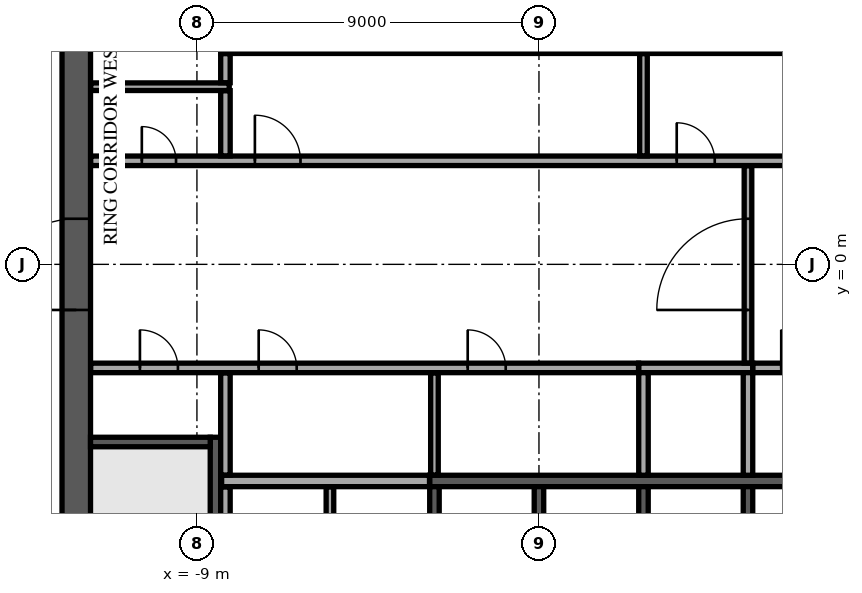
"""IFC4 building model, lengths in metres.
Left out: names, types, materials, properties, quantities, classifications, styles, units other than length and angle.
Written with IfcOpenShell. Run it as: python <this file> out.ifc"""

import sys

from ifc_helpers import new_model, si_unit, direction, frame, frame_2d, origin, place, context, subcontext, project, spatial, rectangle, extrude, element, fill, save


model = new_model("IFC4")
c1 = context("Model", 3, precision=1e-05, world=origin(), true_north=direction((0.0, 1.0)))
c2 = subcontext(c1, "Body", "Model", "MODEL_VIEW")
j1 = project(units=[si_unit("LENGTHUNIT", "METRE"), si_unit("PLANEANGLEUNIT", "RADIAN")], contexts=[c1])
p1 = place(None, origin())
s1 = spatial("IfcSite", under=j1, at=p1, CompositionType="ELEMENT")
p2 = place(p1, origin())
s2 = spatial("IfcBuilding", under=s1, at=p2, CompositionType="ELEMENT")
p3 = place(p2, frame((0.0, 0.0, 274.9)))
s3 = spatial("IfcBuildingStorey", under=s2, at=p3, CompositionType="ELEMENT", Elevation=274.9)
p4 = place(p3, frame((-12.175, -11.8, 0.0), z_axis=(0.0, 0.0, 1.0), x_axis=(0.0, 1.0, 0.0)))
e1 = element("IfcWall", 1, at=p4, inside=s3, PredefinedType="SHEAR", context=c2, shape_type="SweptSolid", body=[
    extrude(rectangle(XDim=23.6, YDim=0.75, at=frame_2d((11.8, 0.0))), origin(), (0.0, 0.0, 1.0), 3.64),
])
p5 = place(p4, frame((10.6, 0.0, 0.0)))
e2 = element("IfcOpeningElement", 2, at=p5, cuts=e1, PredefinedType="OPENING", context=c2, shape_type="SweptSolid", body=[
    extrude(rectangle(XDim=2.4, YDim=2.4, at=frame_2d((1.2, 1.2))), frame((0.0, 0.385, 0.0), z_axis=(0.0, -1.0, 0.0), x_axis=(1.0, 0.0, 0.0)), (0.0, 0.0, 1.0), 0.77),
])
p6 = place(p3, frame((-8.375, 5.7, 0.0), z_axis=(0.0, 0.0, 1.0), x_axis=(1.0, 0.0, 0.0)))
e3 = element("IfcWall", 3, at=p6, inside=s3, PredefinedType="SOLIDWALL", context=c2, shape_type="SweptSolid", body=[
    extrude(rectangle(XDim=16.75, YDim=0.3, at=frame_2d((8.375, 0.0))), origin(), (0.0, 0.0, 1.0), 3.64),
])
p7 = place(p3, frame((-2.875, -5.7, 0.0), z_axis=(0.0, 0.0, 1.0), x_axis=(1.0, 0.0, 0.0)))
e4 = element("IfcWall", 4, at=p7, inside=s3, PredefinedType="SOLIDWALL", context=c2, shape_type="SweptSolid", body=[
    extrude(rectangle(XDim=11.25, YDim=0.3, at=frame_2d((5.625, 0.0))), origin(), (0.0, 0.0, 1.0), 3.64),
])
p8 = place(p3, frame((2.625, -2.725, 0.0), z_axis=(0.0, 0.0, 1.0), x_axis=(1.0, 0.0, 0.0)))
e5 = element("IfcWall", 5, at=p8, inside=s3, PredefinedType="SOLIDWALL", context=c2, shape_type="SweptSolid", body=[
    extrude(rectangle(XDim=3.0, YDim=0.25, at=frame_2d((1.5, 0.0))), origin(), (0.0, 0.0, 1.0), 3.64),
])
for number, where, z_axis, x_axis in (
    (6, (2.75, -5.55, 0.0), (0.0, 0.0, 1.0), (0.0, 1.0, 0.0)),
    (7, (5.5, -5.55, 0.0), (0.0, 0.0, 1.0), (0.0, 1.0, 0.0)),
    (8, (-2.75, -8.55, 0.0), (0.0, 0.0, 1.0), (0.0, 1.0, 0.0)),
    (9, (0.0, -8.55, 0.0), (0.0, 0.0, 1.0), (0.0, 1.0, 0.0)),
    (10, (2.75, -8.55, 0.0), (0.0, 0.0, 1.0), (0.0, 1.0, 0.0)),
    (11, (5.5, -8.55, 0.0), (0.0, 0.0, 1.0), (0.0, 1.0, 0.0)),
):
    element("IfcWall", number, at=place(p3, frame(where, z_axis=z_axis, x_axis=x_axis)), inside=s3, PredefinedType="SOLIDWALL", context=c2, shape_type="SweptSolid", body=[
        extrude(rectangle(XDim=2.7, YDim=0.25, at=frame_2d((1.35, 0.0))), origin(), (0.0, 0.0, 1.0), 3.64),
    ])
p9 = place(p3, frame((-8.512, -4.55, 0.0), z_axis=(0.0, 0.0, 1.0), x_axis=(0.0, -1.0, 0.0)))
e12 = element("IfcWall", 12, at=p9, inside=s3, PredefinedType="SOLIDWALL", context=c2, shape_type="SweptSolid", body=[
    extrude(rectangle(XDim=7.25, YDim=0.275, at=frame_2d((3.625, 0.0))), origin(), (0.0, 0.0, 1.0), 3.64),
])
p10 = place(p9, frame((6.0, 0.0, 0.0)))
e13 = element("IfcOpeningElement", 13, at=p10, cuts=e12, PredefinedType="OPENING", context=c2, shape_type="SweptSolid", body=[
    extrude(rectangle(XDim=1.0, YDim=2.1, at=frame_2d((0.5, 1.05))), frame((0.0, 0.147, 0.0), z_axis=(0.0, -1.0, 0.0), x_axis=(1.0, 0.0, 0.0)), (0.0, 0.0, 1.0), 0.295),
])
p11 = place(p3, frame((-8.65, -4.675, 0.0), z_axis=(0.0, 0.0, 1.0), x_axis=(-1.0, 0.0, 0.0)))
e14 = element("IfcWall", 14, at=p11, inside=s3, PredefinedType="SOLIDWALL", context=c2, shape_type="SweptSolid", body=[
    extrude(rectangle(XDim=3.15, YDim=0.25, at=frame_2d((1.575, 0.0))), origin(), (0.0, 0.0, 1.0), 3.64),
])
p12 = place(p3, frame((-8.25, -8.545, 0.0), z_axis=(0.0, 0.0, 1.0), x_axis=(0.0, 1.0, 0.0)))
e15 = element("IfcWall", 15, at=p12, inside=s3, PredefinedType="PARTITIONING", context=c2, shape_type="SweptSolid", body=[
    extrude(rectangle(XDim=2.69, YDim=0.25, at=frame_2d((1.345, 0.0))), origin(), (0.0, 0.0, 1.0), 3.64),
])
p13 = place(p3, frame((-5.5, -8.545, 0.0), z_axis=(0.0, 0.0, 1.0), x_axis=(0.0, 1.0, 0.0)))
e16 = element("IfcWall", 16, at=p13, inside=s3, PredefinedType="PARTITIONING", context=c2, shape_type="SweptSolid", body=[
    extrude(rectangle(XDim=2.69, YDim=0.2, at=frame_2d((1.345, 0.0))), origin(), (0.0, 0.0, 1.0), 3.64),
])
p14 = place(p3, frame((-8.35, -5.7, 0.0), z_axis=(0.0, 0.0, 1.0), x_axis=(1.0, 0.0, 0.0)))
e17 = element("IfcWall", 17, at=p14, inside=s3, PredefinedType="PARTITIONING", context=c2, shape_type="SweptSolid", body=[
    extrude(rectangle(XDim=5.47, YDim=0.3, at=frame_2d((2.735, 0.0))), origin(), (0.0, 0.0, 1.0), 3.64),
])
p15 = place(p3, frame((-8.25, -5.545, 0.0), z_axis=(0.0, 0.0, 1.0), x_axis=(0.0, 1.0, 0.0)))
e18 = element("IfcWall", 18, at=p15, inside=s3, PredefinedType="PARTITIONING", context=c2, shape_type="SweptSolid", body=[
    extrude(rectangle(XDim=2.69, YDim=0.25, at=frame_2d((1.345, 0.0))), origin(), (0.0, 0.0, 1.0), 3.64),
])
p16 = place(p3, frame((-2.75, -5.545, 0.0), z_axis=(0.0, 0.0, 1.0), x_axis=(0.0, 1.0, 0.0)))
e19 = element("IfcWall", 19, at=p16, inside=s3, PredefinedType="PARTITIONING", context=c2, shape_type="SweptSolid", body=[
    extrude(rectangle(XDim=2.69, YDim=0.2, at=frame_2d((1.345, 0.0))), origin(), (0.0, 0.0, 1.0), 3.64),
])
p17 = place(p3, frame((-11.795, -2.725, 0.0), z_axis=(0.0, 0.0, 1.0), x_axis=(1.0, 0.0, 0.0)))
e20 = element("IfcWall", 20, at=p17, inside=s3, PredefinedType="PARTITIONING", context=c2, shape_type="SweptSolid", body=[
    extrude(rectangle(XDim=14.415, YDim=0.25, at=frame_2d((7.208, 0.0))), origin(), (0.0, 0.0, 1.0), 3.64),
])
p18 = place(p17, frame((1.295, 0.0, 0.0)))
e21 = element("IfcOpeningElement", 21, at=p18, cuts=e20, PredefinedType="OPENING", context=c2, shape_type="SweptSolid", body=[
    extrude(rectangle(XDim=1.0, YDim=2.1, at=frame_2d((0.5, 1.05))), frame((0.0, 0.135, 0.0), z_axis=(0.0, -1.0, 0.0), x_axis=(1.0, 0.0, 0.0)), (0.0, 0.0, 1.0), 0.27),
])
p19 = place(p17, frame((4.42, 0.0, 0.0)))
e22 = element("IfcOpeningElement", 22, at=p19, cuts=e20, PredefinedType="OPENING", context=c2, shape_type="SweptSolid", body=[
    extrude(rectangle(XDim=1.0, YDim=2.1, at=frame_2d((0.5, 1.05))), frame((0.0, 0.135, 0.0), z_axis=(0.0, -1.0, 0.0), x_axis=(1.0, 0.0, 0.0)), (0.0, 0.0, 1.0), 0.27),
])
p20 = place(p17, frame((9.92, 0.0, 0.0)))
e23 = element("IfcOpeningElement", 23, at=p20, cuts=e20, PredefinedType="OPENING", context=c2, shape_type="SweptSolid", body=[
    extrude(rectangle(XDim=1.0, YDim=2.1, at=frame_2d((0.5, 1.05))), frame((0.0, 0.135, 0.0), z_axis=(0.0, -1.0, 0.0), x_axis=(1.0, 0.0, 0.0)), (0.0, 0.0, 1.0), 0.27),
])
p21 = place(p3, frame((5.63, -2.725, 0.0), z_axis=(0.0, 0.0, 1.0), x_axis=(1.0, 0.0, 0.0)))
e24 = element("IfcWall", 24, at=p21, inside=s3, PredefinedType="PARTITIONING", context=c2, shape_type="SweptSolid", body=[
    extrude(rectangle(XDim=6.165, YDim=0.25, at=frame_2d((3.083, 0.0))), origin(), (0.0, 0.0, 1.0), 3.64),
])
p22 = place(p21, frame((0.745, 0.0, 0.0)))
e25 = element("IfcOpeningElement", 25, at=p22, cuts=e24, PredefinedType="OPENING", context=c2, shape_type="SweptSolid", body=[
    extrude(rectangle(XDim=1.0, YDim=2.1, at=frame_2d((0.5, 1.05))), frame((0.0, 0.135, 0.0), z_axis=(0.0, -1.0, 0.0), x_axis=(1.0, 0.0, 0.0)), (0.0, 0.0, 1.0), 0.27),
])
p23 = place(p21, frame((3.92, 0.0, 0.0)))
e26 = element("IfcOpeningElement", 26, at=p23, cuts=e24, PredefinedType="OPENING", context=c2, shape_type="SweptSolid", body=[
    extrude(rectangle(XDim=0.9, YDim=2.1, at=frame_2d((0.45, 1.05))), frame((0.0, 0.135, 0.0), z_axis=(0.0, -1.0, 0.0), x_axis=(1.0, 0.0, 0.0)), (0.0, 0.0, 1.0), 0.27),
])
p24 = place(p3, frame((5.5, -2.595, 0.0), z_axis=(0.0, 0.0, 1.0), x_axis=(0.0, 1.0, 0.0)))
e27 = element("IfcWall", 27, at=p24, inside=s3, PredefinedType="PARTITIONING", context=c2, shape_type="SweptSolid", body=[
    extrude(rectangle(XDim=5.19, YDim=0.2, at=frame_2d((2.595, 0.0))), origin(), (0.0, 0.0, 1.0), 3.64),
])
p25 = place(p24, frame((1.395, 0.0, 0.0)))
e28 = element("IfcOpeningElement", 28, at=p25, cuts=e27, PredefinedType="OPENING", context=c2, shape_type="SweptSolid", body=[
    extrude(rectangle(XDim=2.4, YDim=2.4, at=frame_2d((1.2, 1.2))), frame((0.0, 0.11, 0.0), z_axis=(0.0, -1.0, 0.0), x_axis=(1.0, 0.0, 0.0)), (0.0, 0.0, 1.0), 0.22),
])
p26 = place(p3, frame((-11.795, 2.725, 0.0), z_axis=(0.0, 0.0, 1.0), x_axis=(1.0, 0.0, 0.0)))
e29 = element("IfcWall", 29, at=p26, inside=s3, PredefinedType="PARTITIONING", context=c2, shape_type="SweptSolid", body=[
    extrude(rectangle(XDim=23.59, YDim=0.25, at=frame_2d((11.795, 0.0))), origin(), (0.0, 0.0, 1.0), 3.64),
])
p27 = place(p26, frame((21.345, 0.0, 0.0)))
e30 = element("IfcOpeningElement", 30, at=p27, cuts=e29, PredefinedType="OPENING", context=c2, shape_type="SweptSolid", body=[
    extrude(rectangle(XDim=0.9, YDim=2.1, at=frame_2d((0.45, 1.05))), frame((0.0, 0.135, 0.0), z_axis=(0.0, -1.0, 0.0), x_axis=(1.0, 0.0, 0.0)), (0.0, 0.0, 1.0), 0.27),
])
p28 = place(p26, frame((1.345, 0.0, 0.0)))
e31 = element("IfcOpeningElement", 31, at=p28, cuts=e29, PredefinedType="OPENING", context=c2, shape_type="SweptSolid", body=[
    extrude(rectangle(XDim=0.9, YDim=2.1, at=frame_2d((0.45, 1.05))), frame((0.0, 0.135, 0.0), z_axis=(0.0, -1.0, 0.0), x_axis=(1.0, 0.0, 0.0)), (0.0, 0.0, 1.0), 0.27),
])
p29 = place(p26, frame((4.32, 0.0, 0.0)))
e32 = element("IfcOpeningElement", 32, at=p29, cuts=e29, PredefinedType="OPENING", context=c2, shape_type="SweptSolid", body=[
    extrude(rectangle(XDim=1.2, YDim=2.1, at=frame_2d((0.6, 1.05))), frame((0.0, 0.135, 0.0), z_axis=(0.0, -1.0, 0.0), x_axis=(1.0, 0.0, 0.0)), (0.0, 0.0, 1.0), 0.27),
])
p30 = place(p26, frame((15.42, 0.0, 0.0)))
e33 = element("IfcOpeningElement", 33, at=p30, cuts=e29, PredefinedType="OPENING", context=c2, shape_type="SweptSolid", body=[
    extrude(rectangle(XDim=1.0, YDim=2.1, at=frame_2d((0.5, 1.05))), frame((0.0, 0.135, 0.0), z_axis=(0.0, -1.0, 0.0), x_axis=(1.0, 0.0, 0.0)), (0.0, 0.0, 1.0), 0.27),
])
p31 = place(p3, frame((-8.25, 2.855, 0.0), z_axis=(0.0, 0.0, 1.0), x_axis=(0.0, 1.0, 0.0)))
e34 = element("IfcWall", 34, at=p31, inside=s3, PredefinedType="PARTITIONING", context=c2, shape_type="SweptSolid", body=[
    extrude(rectangle(XDim=1.715, YDim=0.25, at=frame_2d((0.857, 0.0))), origin(), (0.0, 0.0, 1.0), 3.64),
])
p32 = place(p3, frame((2.75, 2.855, 0.0), z_axis=(0.0, 0.0, 1.0), x_axis=(0.0, 1.0, 0.0)))
e35 = element("IfcWall", 35, at=p32, inside=s3, PredefinedType="PARTITIONING", context=c2, shape_type="SweptSolid", body=[
    extrude(rectangle(XDim=2.69, YDim=0.2, at=frame_2d((1.345, 0.0))), origin(), (0.0, 0.0, 1.0), 3.64),
])
p33 = place(p3, frame((-11.795, 4.675, 0.0), z_axis=(0.0, 0.0, 1.0), x_axis=(1.0, 0.0, 0.0)))
e36 = element("IfcWall", 36, at=p33, inside=s3, PredefinedType="PARTITIONING", context=c2, shape_type="SweptSolid", body=[
    extrude(rectangle(XDim=3.645, YDim=0.2, at=frame_2d((1.823, 0.0))), origin(), (0.0, 0.0, 1.0), 3.64),
])
p34 = place(p3, frame((-8.25, 4.78, 0.0), z_axis=(0.0, 0.0, 1.0), x_axis=(0.0, 1.0, 0.0)))
e37 = element("IfcWall", 37, at=p34, inside=s3, PredefinedType="PARTITIONING", context=c2, shape_type="SweptSolid", body=[
    extrude(rectangle(XDim=0.765, YDim=0.25, at=frame_2d((0.382, 0.0))), origin(), (0.0, 0.0, 1.0), 3.64),
])
p35 = place(p3, frame((-9.159, 32.618, 0.0), z_axis=(0.0, 0.0, 1.0), x_axis=(-0.469470468388, -0.88294817476, 0.0)))
e38 = element("IfcWall", 38, at=p35, inside=s3, PredefinedType="STANDARD", context=c2, shape_type="SweptSolid", body=[
    extrude(rectangle(XDim=48.843, YDim=0.6, at=frame_2d((24.422, 0.0))), origin(), (0.0, 0.0, 1.0), 3.64),
])
p36 = place(p35, frame((1.22, 0.0, 0.9)))
e39 = element("IfcOpeningElement", 39, at=p36, cuts=e38, PredefinedType="OPENING", context=c2, shape_type="SweptSolid", body=[
    extrude(rectangle(XDim=2.0, YDim=2.1, at=frame_2d((1.0, 1.05))), frame((0.0, 0.31, 0.0), z_axis=(0.0, -1.0, 0.0), x_axis=(1.0, 0.0, 0.0)), (0.0, 0.0, 1.0), 0.62),
])
p37 = place(p35, frame((5.66, 0.0, 0.9)))
e40 = element("IfcOpeningElement", 40, at=p37, cuts=e38, PredefinedType="OPENING", context=c2, shape_type="SweptSolid", body=[
    extrude(rectangle(XDim=2.0, YDim=2.1, at=frame_2d((1.0, 1.05))), frame((0.0, 0.31, 0.0), z_axis=(0.0, -1.0, 0.0), x_axis=(1.0, 0.0, 0.0)), (0.0, 0.0, 1.0), 0.62),
])
p38 = place(p35, frame((10.101, 0.0, 0.9)))
e41 = element("IfcOpeningElement", 41, at=p38, cuts=e38, PredefinedType="OPENING", context=c2, shape_type="SweptSolid", body=[
    extrude(rectangle(XDim=2.0, YDim=2.1, at=frame_2d((1.0, 1.05))), frame((0.0, 0.31, 0.0), z_axis=(0.0, -1.0, 0.0), x_axis=(1.0, 0.0, 0.0)), (0.0, 0.0, 1.0), 0.62),
])
p39 = place(p35, frame((14.541, 0.0, 0.9)))
e42 = element("IfcOpeningElement", 42, at=p39, cuts=e38, PredefinedType="OPENING", context=c2, shape_type="SweptSolid", body=[
    extrude(rectangle(XDim=2.0, YDim=2.1, at=frame_2d((1.0, 1.05))), frame((0.0, 0.31, 0.0), z_axis=(0.0, -1.0, 0.0), x_axis=(1.0, 0.0, 0.0)), (0.0, 0.0, 1.0), 0.62),
])
p40 = place(p35, frame((18.981, 0.0, 0.9)))
e43 = element("IfcOpeningElement", 43, at=p40, cuts=e38, PredefinedType="OPENING", context=c2, shape_type="SweptSolid", body=[
    extrude(rectangle(XDim=2.0, YDim=2.1, at=frame_2d((1.0, 1.05))), frame((0.0, 0.31, 0.0), z_axis=(0.0, -1.0, 0.0), x_axis=(1.0, 0.0, 0.0)), (0.0, 0.0, 1.0), 0.62),
])
p41 = place(p35, frame((23.422, 0.0, 0.9)))
e44 = element("IfcOpeningElement", 44, at=p41, cuts=e38, PredefinedType="OPENING", context=c2, shape_type="SweptSolid", body=[
    extrude(rectangle(XDim=2.0, YDim=2.1, at=frame_2d((1.0, 1.05))), frame((0.0, 0.31, 0.0), z_axis=(0.0, -1.0, 0.0), x_axis=(1.0, 0.0, 0.0)), (0.0, 0.0, 1.0), 0.62),
])
p42 = place(p35, frame((27.862, 0.0, 0.9)))
e45 = element("IfcOpeningElement", 45, at=p42, cuts=e38, PredefinedType="OPENING", context=c2, shape_type="SweptSolid", body=[
    extrude(rectangle(XDim=2.0, YDim=2.1, at=frame_2d((1.0, 1.05))), frame((0.0, 0.31, 0.0), z_axis=(0.0, -1.0, 0.0), x_axis=(1.0, 0.0, 0.0)), (0.0, 0.0, 1.0), 0.62),
])
p43 = place(p35, frame((32.302, 0.0, 0.9)))
e46 = element("IfcOpeningElement", 46, at=p43, cuts=e38, PredefinedType="OPENING", context=c2, shape_type="SweptSolid", body=[
    extrude(rectangle(XDim=2.0, YDim=2.1, at=frame_2d((1.0, 1.05))), frame((0.0, 0.31, 0.0), z_axis=(0.0, -1.0, 0.0), x_axis=(1.0, 0.0, 0.0)), (0.0, 0.0, 1.0), 0.62),
])
p44 = place(p35, frame((36.742, 0.0, 0.9)))
e47 = element("IfcOpeningElement", 47, at=p44, cuts=e38, PredefinedType="OPENING", context=c2, shape_type="SweptSolid", body=[
    extrude(rectangle(XDim=2.0, YDim=2.1, at=frame_2d((1.0, 1.05))), frame((0.0, 0.31, 0.0), z_axis=(0.0, -1.0, 0.0), x_axis=(1.0, 0.0, 0.0)), (0.0, 0.0, 1.0), 0.62),
])
p45 = place(p35, frame((41.183, 0.0, 0.9)))
e48 = element("IfcOpeningElement", 48, at=p45, cuts=e38, PredefinedType="OPENING", context=c2, shape_type="SweptSolid", body=[
    extrude(rectangle(XDim=2.0, YDim=2.1, at=frame_2d((1.0, 1.05))), frame((0.0, 0.31, 0.0), z_axis=(0.0, -1.0, 0.0), x_axis=(1.0, 0.0, 0.0)), (0.0, 0.0, 1.0), 0.62),
])
p46 = place(p35, frame((45.623, 0.0, 0.9)))
e49 = element("IfcOpeningElement", 49, at=p46, cuts=e38, PredefinedType="OPENING", context=c2, shape_type="SweptSolid", body=[
    extrude(rectangle(XDim=2.0, YDim=2.1, at=frame_2d((1.0, 1.05))), frame((0.0, 0.31, 0.0), z_axis=(0.0, -1.0, 0.0), x_axis=(1.0, 0.0, 0.0)), (0.0, 0.0, 1.0), 0.62),
])
p47 = place(p5, origin())
e50 = element("IfcDoor", 50, at=p47, inside=s3, OperationType="SINGLE_SWING_LEFT", PredefinedType="DOOR", context=c2, shape_type="SweptSolid", body=[
    extrude(rectangle(XDim=2.4, YDim=2.4, at=frame_2d((1.2, 1.2))), frame((0.0, 0.025, 0.0), z_axis=(0.0, -1.0, 0.0), x_axis=(1.0, 0.0, 0.0)), (0.0, 0.0, 1.0), 0.05),
])
fill(e2, e50)
p48 = place(p18, origin())
e51 = element("IfcDoor", 51, at=p48, inside=s3, OperationType="SINGLE_SWING_RIGHT", PredefinedType="DOOR", context=c2, shape_type="SweptSolid", body=[
    extrude(rectangle(XDim=1.0, YDim=2.1, at=frame_2d((0.5, 1.05))), frame((0.0, 0.025, 0.0), z_axis=(0.0, -1.0, 0.0), x_axis=(1.0, 0.0, 0.0)), (0.0, 0.0, 1.0), 0.05),
])
fill(e21, e51)
p49 = place(p22, origin())
e52 = element("IfcDoor", 52, at=p49, inside=s3, OperationType="SINGLE_SWING_RIGHT", PredefinedType="DOOR", context=c2, shape_type="SweptSolid", body=[
    extrude(rectangle(XDim=1.0, YDim=2.1, at=frame_2d((0.5, 1.05))), frame((0.0, 0.025, 0.0), z_axis=(0.0, -1.0, 0.0), x_axis=(1.0, 0.0, 0.0)), (0.0, 0.0, 1.0), 0.05),
])
fill(e25, e52)
p50 = place(p28, origin())
e53 = element("IfcDoor", 53, at=p50, inside=s3, OperationType="SINGLE_SWING_RIGHT", PredefinedType="DOOR", context=c2, shape_type="SweptSolid", body=[
    extrude(rectangle(XDim=0.9, YDim=2.1, at=frame_2d((0.45, 1.05))), frame((0.0, 0.025, 0.0), z_axis=(0.0, -1.0, 0.0), x_axis=(1.0, 0.0, 0.0)), (0.0, 0.0, 1.0), 0.05),
])
fill(e31, e53)
p51 = place(p29, origin())
e54 = element("IfcDoor", 54, at=p51, inside=s3, OperationType="SINGLE_SWING_LEFT", PredefinedType="DOOR", context=c2, shape_type="SweptSolid", body=[
    extrude(rectangle(XDim=1.2, YDim=2.1, at=frame_2d((0.6, 1.05))), frame((0.0, 0.025, 0.0), z_axis=(0.0, -1.0, 0.0), x_axis=(1.0, 0.0, 0.0)), (0.0, 0.0, 1.0), 0.05),
])
fill(e32, e54)
p52 = place(p30, origin())
e55 = element("IfcDoor", 55, at=p52, inside=s3, OperationType="SINGLE_SWING_RIGHT", PredefinedType="DOOR", context=c2, shape_type="SweptSolid", body=[
    extrude(rectangle(XDim=1.0, YDim=2.1, at=frame_2d((0.5, 1.05))), frame((0.0, 0.025, 0.0), z_axis=(0.0, -1.0, 0.0), x_axis=(1.0, 0.0, 0.0)), (0.0, 0.0, 1.0), 0.05),
])
fill(e33, e55)
p53 = place(p19, origin())
e56 = element("IfcDoor", 56, at=p53, inside=s3, OperationType="SINGLE_SWING_RIGHT", PredefinedType="DOOR", context=c2, shape_type="SweptSolid", body=[
    extrude(rectangle(XDim=1.0, YDim=2.1, at=frame_2d((0.5, 1.05))), frame((0.0, 0.025, 0.0), z_axis=(0.0, -1.0, 0.0), x_axis=(1.0, 0.0, 0.0)), (0.0, 0.0, 1.0), 0.05),
])
fill(e22, e56)
p54 = place(p20, origin())
e57 = element("IfcDoor", 57, at=p54, inside=s3, OperationType="SINGLE_SWING_RIGHT", PredefinedType="DOOR", context=c2, shape_type="SweptSolid", body=[
    extrude(rectangle(XDim=1.0, YDim=2.1, at=frame_2d((0.5, 1.05))), frame((0.0, 0.025, 0.0), z_axis=(0.0, -1.0, 0.0), x_axis=(1.0, 0.0, 0.0)), (0.0, 0.0, 1.0), 0.05),
])
fill(e23, e57)
p55 = place(p25, origin())
e58 = element("IfcDoor", 58, at=p55, inside=s3, OperationType="DOUBLE_DOOR_DOUBLE_SWING", PredefinedType="DOOR", context=c2, shape_type="SweptSolid", body=[
    extrude(rectangle(XDim=2.4, YDim=2.4, at=frame_2d((1.2, 1.2))), frame((0.0, 0.025, 0.0), z_axis=(0.0, -1.0, 0.0), x_axis=(1.0, 0.0, 0.0)), (0.0, 0.0, 1.0), 0.05),
])
fill(e28, e58)
save(model, sys.argv[1])
